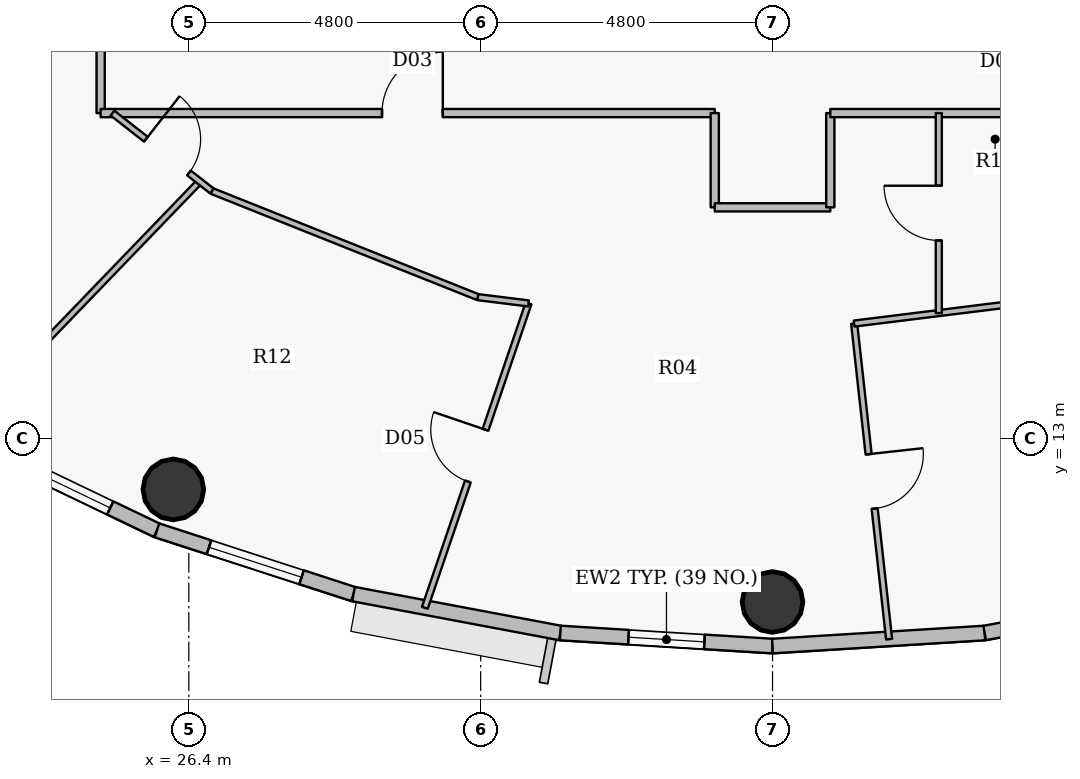
"""IFC4 building model, lengths in metres.
Left out: names, types, materials, properties, quantities, classifications, styles, units other than length and angle.
Written with IfcOpenShell. Run it as: python <this file> out.ifc"""

import sys

from ifc_helpers import new_model, si_unit, direction, frame, frame_2d, origin, origin_2d, place, context, subcontext, project, spatial, rectangle, hollow_circle, extrude, source, transform, mapped, element, fill, save


model = new_model("IFC4")
c1 = context("Model", 3, precision=1e-05, world=origin(), true_north=direction((0.0, 1.0)))
c2 = subcontext(c1, "Body", "Model", "MODEL_VIEW")
j1 = project(units=[si_unit("LENGTHUNIT", "METRE"), si_unit("PLANEANGLEUNIT", "RADIAN")], contexts=[c1])
p1 = place(None, origin())
s1 = spatial("IfcSite", under=j1, at=p1, CompositionType="ELEMENT")
p2 = place(p1, origin())
s2 = spatial("IfcBuilding", under=s1, at=p2, CompositionType="ELEMENT")
p3 = place(p2, frame((0.0, 0.0, 284.25)))
s3 = spatial("IfcBuildingStorey", under=s2, at=p3, CompositionType="ELEMENT", Elevation=284.25)
for number, where, z_axis, x_axis in (
    (1, (26.146, 12.161, 0.0), (0.0, 0.0, 1.0), (1.0, 0.0, 0.0)),
    (2, (36.0, 10.31, 0.0), (0.0, 0.0, 1.0), (1.0, 0.0, 0.0)),
):
    element("IfcColumn", number, at=place(p3, frame(where, z_axis=z_axis, x_axis=x_axis)), inside=s3, PredefinedType="COLUMN", context=c2, shape_type="SweptSolid", body=[
        extrude(hollow_circle(Radius=0.5, WallThickness=0.032, at=origin_2d()), origin(), (0.0, 0.0, 1.0), 3.75),
    ])
p4 = place(p3, frame((25.877, 11.488, 0.0), z_axis=(0.0, 0.0, 1.0), x_axis=(-0.901573741254, 0.43262546051, 0.0)))
e3 = element("IfcWall", 3, at=p4, inside=s3, PredefinedType="SOLIDWALL", context=c2, shape_type="SweptSolid", body=[
    extrude(rectangle(XDim=3.307, YDim=0.24, at=frame_2d((1.653, 0.0))), origin(), (0.0, 0.0, 1.0), 3.5),
])
p5 = place(p4, frame((0.853, 0.0, 0.9)))
e4 = element("IfcOpeningElement", 4, at=p5, cuts=e3, PredefinedType="OPENING", context=c2, shape_type="SweptSolid", body=[
    extrude(rectangle(XDim=1.6, YDim=1.75, at=origin_2d()), frame((0.8, 0.13, 0.875), z_axis=(0.0, -1.0, 0.0), x_axis=(1.0, 0.0, 0.0)), (0.0, 0.0, 1.0), 0.26),
])
p6 = place(p3, frame((29.109, 10.44, 0.0), z_axis=(0.0, 0.0, 1.0), x_axis=(-0.95123136723, 0.308478339592, 0.0)))
e5 = element("IfcWall", 5, at=p6, inside=s3, PredefinedType="SOLIDWALL", context=c2, shape_type="SweptSolid", body=[
    extrude(rectangle(XDim=3.398, YDim=0.24, at=frame_2d((1.699, 0.0))), origin(), (0.0, 0.0, 1.0), 3.5),
])
p7 = place(p6, frame((0.899, 0.0, 0.9)))
e6 = element("IfcOpeningElement", 6, at=p7, cuts=e5, PredefinedType="OPENING", context=c2, shape_type="SweptSolid", body=[
    extrude(rectangle(XDim=1.6, YDim=1.75, at=origin_2d()), frame((0.8, 0.13, 0.875), z_axis=(0.0, -1.0, 0.0), x_axis=(1.0, 0.0, 0.0)), (0.0, 0.0, 1.0), 0.26),
])
p8 = place(p3, frame((32.511, 9.8, 0.0), z_axis=(0.0, 0.0, 1.0), x_axis=(-0.982782655757, 0.184765395959, 0.0)))
e7 = element("IfcWall", 7, at=p8, inside=s3, PredefinedType="SOLIDWALL", context=c2, shape_type="SweptSolid", body=[
    extrude(rectangle(XDim=3.462, YDim=0.24, at=frame_2d((1.731, 0.0))), origin(), (0.0, 0.0, 1.0), 3.5),
])
p9 = place(p3, frame((36.0, 9.585, 0.0), z_axis=(0.0, 0.0, 1.0), x_axis=(-0.998104946479, 0.061534671648, 0.0)))
e8 = element("IfcWall", 8, at=p9, inside=s3, PredefinedType="SOLIDWALL", context=c2, shape_type="SweptSolid", body=[
    extrude(rectangle(XDim=3.495, YDim=0.24, at=frame_2d((1.748, 0.0))), origin(), (0.0, 0.0, 1.0), 3.5),
])
p10 = place(p9, frame((1.123, 0.0, 0.9)))
e9 = element("IfcOpeningElement", 9, at=p10, cuts=e8, PredefinedType="OPENING", context=c2, shape_type="SweptSolid", body=[
    extrude(rectangle(XDim=1.25, YDim=1.65, at=origin_2d()), frame((0.625, 0.13, 0.825), z_axis=(0.0, -1.0, 0.0), x_axis=(1.0, 0.0, 0.0)), (0.0, 0.0, 1.0), 0.26),
])
p11 = place(p3, frame((39.489, 9.8, 0.0), z_axis=(0.0, 0.0, 1.0), x_axis=(-0.998104946479, -0.061534671648, 0.0)))
e10 = element("IfcWall", 10, at=p11, inside=s3, PredefinedType="SOLIDWALL", context=c2, shape_type="SweptSolid", body=[
    extrude(rectangle(XDim=3.495, YDim=0.24, at=frame_2d((1.748, 0.0))), origin(), (0.0, 0.0, 1.0), 3.5),
])
p12 = place(p3, frame((42.891, 10.44, 0.0), z_axis=(0.0, 0.0, 1.0), x_axis=(-0.982782655757, -0.184765395959, 0.0)))
e11 = element("IfcWall", 11, at=p12, inside=s3, PredefinedType="SOLIDWALL", context=c2, shape_type="SweptSolid", body=[
    extrude(rectangle(XDim=3.462, YDim=0.24, at=frame_2d((1.731, 0.0))), origin(), (0.0, 0.0, 1.0), 3.5),
])
p13 = place(p12, frame((1.106, 0.0, 0.9)))
e12 = element("IfcOpeningElement", 12, at=p13, cuts=e11, PredefinedType="OPENING", context=c2, shape_type="SweptSolid", body=[
    extrude(rectangle(XDim=1.25, YDim=1.65, at=origin_2d()), frame((0.625, 0.13, 0.825), z_axis=(0.0, -1.0, 0.0), x_axis=(1.0, 0.0, 0.0)), (0.0, 0.0, 1.0), 0.26),
])
p14 = place(p3, frame((16.007, 19.358, 0.0), z_axis=(0.0, 0.0, 1.0), x_axis=(0.934094110355, 0.35702687994, 0.0)))
e13 = element("IfcWall", 13, at=p14, inside=s3, PredefinedType="PARTITIONING", context=c2, shape_type="SweptSolid", body=[
    extrude(rectangle(XDim=9.574, YDim=0.135, at=frame_2d((4.787, 0.0))), origin(), (0.0, 0.0, 1.0), 2.985),
])
p15 = place(p3, frame((22.607, 13.105, 0.0), z_axis=(0.0, 0.0, 1.0), x_axis=(0.693978480191, 0.71999574237, 0.0)))
e14 = element("IfcWall", 14, at=p15, inside=s3, PredefinedType="PARTITIONING", context=c2, shape_type="SweptSolid", body=[
    extrude(rectangle(XDim=5.724, YDim=0.1, at=frame_2d((2.862, 0.0))), origin(), (0.0, 0.0, 1.0), 2.985),
])
p16 = place(p3, frame((24.95, 18.35, 0.0), z_axis=(0.0, 0.0, 1.0), x_axis=(0.0, 1.0, 0.0)))
e15 = element("IfcWall", 15, at=p16, inside=s3, PredefinedType="PARTITIONING", context=c2, shape_type="SweptSolid", body=[
    extrude(rectangle(XDim=17.147, YDim=0.135, at=frame_2d((8.574, 0.0))), origin(), (0.0, 0.0, 1.0), 3.035),
])
p17 = place(p16, frame((10.267, 0.0, 0.0)))
e16 = element("IfcOpeningElement", 16, at=p17, cuts=e15, PredefinedType="OPENING", context=c2, shape_type="SweptSolid", body=[
    extrude(rectangle(XDim=1.0, YDim=2.15, at=origin_2d()), frame((0.5, 0.078, 1.075), z_axis=(0.0, -1.0, 0.0), x_axis=(1.0, 0.0, 0.0)), (0.0, 0.0, 1.0), 0.155),
])
p18 = place(p3, frame((24.95, 18.35, 0.0), z_axis=(0.0, 0.0, 1.0), x_axis=(1.0, 0.0, 0.0)))
e17 = element("IfcWall", 17, at=p18, inside=s3, PredefinedType="PARTITIONING", context=c2, shape_type="SweptSolid", body=[
    extrude(rectangle(XDim=10.1, YDim=0.135, at=frame_2d((5.05, 0.0))), origin(), (0.0, 0.0, 1.0), 3.035),
])
p19 = place(p18, frame((4.627, 0.0, 0.0)))
e18 = element("IfcOpeningElement", 18, at=p19, cuts=e17, PredefinedType="OPENING", context=c2, shape_type="SweptSolid", body=[
    extrude(rectangle(XDim=1.0, YDim=2.15, at=origin_2d()), frame((0.5, 0.078, 1.075), z_axis=(0.0, -1.0, 0.0), x_axis=(1.0, 0.0, 0.0)), (0.0, 0.0, 1.0), 0.155),
])
p20 = place(p3, frame((25.145, 18.35, 0.0), z_axis=(0.0, 0.0, 1.0), x_axis=(0.787326747019, -0.616535962803, 0.0)))
e19 = element("IfcWall", 19, at=p20, inside=s3, PredefinedType="PARTITIONING", context=c2, shape_type="SweptSolid", body=[
    extrude(rectangle(XDim=2.081, YDim=0.1, at=frame_2d((1.041, 0.0))), origin(), (0.0, 0.0, 1.0), 3.5),
])
p21 = place(p20, frame((0.698, 0.0, 0.0)))
e20 = element("IfcOpeningElement", 20, at=p21, cuts=e19, PredefinedType="OPENING", context=c2, shape_type="SweptSolid", body=[
    extrude(rectangle(XDim=0.9, YDim=2.1, at=origin_2d()), frame((0.45, 0.06, 1.05), z_axis=(0.0, -1.0, 0.0), x_axis=(1.0, 0.0, 0.0)), (0.0, 0.0, 1.0), 0.12),
])
p22 = place(p3, frame((26.783, 17.067, 0.0), z_axis=(0.0, 0.0, 1.0), x_axis=(0.928809047774, -0.370558703544, 0.0)))
e21 = element("IfcWall", 21, at=p22, inside=s3, PredefinedType="PARTITIONING", context=c2, shape_type="SweptSolid", body=[
    extrude(rectangle(XDim=4.706, YDim=0.1, at=frame_2d((2.353, 0.0))), origin(), (0.0, 0.0, 1.0), 3.035),
])
p23 = place(p3, frame((30.282, 10.214, 0.0), z_axis=(0.0, 0.0, 1.0), x_axis=(0.322425759237, 0.946594754782, 0.0)))
e22 = element("IfcWall", 22, at=p23, inside=s3, PredefinedType="PARTITIONING", context=c2, shape_type="SweptSolid", body=[
    extrude(rectangle(XDim=5.288, YDim=0.1, at=frame_2d((2.644, 0.0))), origin(), (0.0, 0.0, 1.0), 2.985),
])
p24 = place(p23, frame((2.194, 0.0, 0.0)))
e23 = element("IfcOpeningElement", 23, at=p24, cuts=e22, PredefinedType="OPENING", context=c2, shape_type="SweptSolid", body=[
    extrude(rectangle(XDim=0.9, YDim=2.1, at=origin_2d()), frame((0.45, 0.06, 1.05), z_axis=(0.0, -1.0, 0.0), x_axis=(1.0, 0.0, 0.0)), (0.0, 0.0, 1.0), 0.12),
])
p25 = place(p3, frame((31.155, 15.323, 0.0), z_axis=(0.0, 0.0, 1.0), x_axis=(0.992393849535, -0.123103401277, 0.0)))
e24 = element("IfcWall", 24, at=p25, inside=s3, PredefinedType="PARTITIONING", context=c2, shape_type="SweptSolid", body=[
    extrude(rectangle(XDim=0.839, YDim=0.1, at=frame_2d((0.419, 0.0))), origin(), (0.0, 0.0, 1.0), 3.5),
])
p26 = place(p3, frame((35.05, 16.8, 0.0), z_axis=(0.0, 0.0, 1.0), x_axis=(0.0, 1.0, 0.0)))
e25 = element("IfcWall", 25, at=p26, inside=s3, PredefinedType="PARTITIONING", context=c2, shape_type="SweptSolid", body=[
    extrude(rectangle(XDim=1.55, YDim=0.135, at=frame_2d((0.775, 0.0))), origin(), (0.0, 0.0, 1.0), 3.185),
])
p27 = place(p3, frame((35.05, 16.8, 0.0), z_axis=(0.0, 0.0, 1.0), x_axis=(1.0, 0.0, 0.0)))
e26 = element("IfcWall", 26, at=p27, inside=s3, PredefinedType="PARTITIONING", context=c2, shape_type="SweptSolid", body=[
    extrude(rectangle(XDim=1.9, YDim=0.135, at=frame_2d((0.95, 0.0))), origin(), (0.0, 0.0, 1.0), 3.035),
])
p28 = place(p3, frame((36.95, 16.8, 0.0), z_axis=(0.0, 0.0, 1.0), x_axis=(0.0, 1.0, 0.0)))
e27 = element("IfcWall", 27, at=p28, inside=s3, PredefinedType="PARTITIONING", context=c2, shape_type="SweptSolid", body=[
    extrude(rectangle(XDim=1.55, YDim=0.135, at=frame_2d((0.775, 0.0))), origin(), (0.0, 0.0, 1.0), 3.5),
])
p29 = place(p3, frame((36.95, 18.35, 0.0), z_axis=(0.0, 0.0, 1.0), x_axis=(1.0, 0.0, 0.0)))
e28 = element("IfcWall", 28, at=p29, inside=s3, PredefinedType="PARTITIONING", context=c2, shape_type="SweptSolid", body=[
    extrude(rectangle(XDim=10.1, YDim=0.135, at=frame_2d((5.05, 0.0))), origin(), (0.0, 0.0, 1.0), 3.035),
])
p30 = place(p3, frame((37.342, 14.888, 0.0), z_axis=(0.0, 0.0, 1.0), x_axis=(0.110149295127, -0.993915053102, 0.0)))
e29 = element("IfcWall", 29, at=p30, inside=s3, PredefinedType="PARTITIONING", context=c2, shape_type="SweptSolid", body=[
    extrude(rectangle(XDim=5.222, YDim=0.1, at=frame_2d((2.611, 0.0))), origin(), (0.0, 0.0, 1.0), 2.985),
])
p31 = place(p30, frame((2.161, 0.0, 0.0)))
e30 = element("IfcOpeningElement", 30, at=p31, cuts=e29, PredefinedType="OPENING", context=c2, shape_type="SweptSolid", body=[
    extrude(rectangle(XDim=0.9, YDim=2.1, at=origin_2d()), frame((0.45, 0.06, 1.05), z_axis=(0.0, -1.0, 0.0), x_axis=(1.0, 0.0, 0.0)), (0.0, 0.0, 1.0), 0.12),
])
p32 = place(p3, frame((37.342, 14.888, 0.0), z_axis=(0.0, 0.0, 1.0), x_axis=(0.992393420873, 0.123106856865, 0.0)))
e31 = element("IfcWall", 31, at=p32, inside=s3, PredefinedType="PARTITIONING", context=c2, shape_type="SweptSolid", body=[
    extrude(rectangle(XDim=3.53, YDim=0.1, at=frame_2d((1.765, 0.0))), origin(), (0.0, 0.0, 1.0), 3.035),
])
p33 = place(p3, frame((38.734, 15.061, 0.0), z_axis=(0.0, 0.0, 1.0), x_axis=(0.0, 1.0, 0.0)))
e32 = element("IfcWall", 32, at=p33, inside=s3, PredefinedType="PARTITIONING", context=c2, shape_type="SweptSolid", body=[
    extrude(rectangle(XDim=3.289, YDim=0.1, at=frame_2d((1.645, 0.0))), origin(), (0.0, 0.0, 1.0), 3.5),
])
p34 = place(p33, frame((1.194, 0.0, 0.0)))
e33 = element("IfcOpeningElement", 33, at=p34, cuts=e32, PredefinedType="OPENING", context=c2, shape_type="SweptSolid", body=[
    extrude(rectangle(XDim=0.9, YDim=2.1, at=origin_2d()), frame((0.45, 0.06, 1.05), z_axis=(0.0, -1.0, 0.0), x_axis=(1.0, 0.0, 0.0)), (0.0, 0.0, 1.0), 0.12),
])
m1 = source(origin(), c2, "Body", "SweptSolid", [
    extrude(rectangle(XDim=1.6, YDim=1.75, at=origin_2d()), frame((0.8, 0.03, 0.875), z_axis=(0.0, -1.0, 0.0), x_axis=(1.0, 0.0, 0.0)), (0.0, 0.0, 1.0), 0.06),
])
p35 = place(p5, origin())
e34 = element("IfcWindow", 34, at=p35, inside=s3, PartitioningType="DOUBLE_PANEL_VERTICAL", PredefinedType="WINDOW", context=c2, shape_type="MappedRepresentation", body=[
    mapped(m1, transform((0.0, 0.0, 0.0), x_axis=(1.0, 0.0, 0.0), y_axis=(0.0, 1.0, 0.0), z_axis=(0.0, 0.0, 1.0), scale=1.0)),
])
fill(e4, e34)
p36 = place(p7, origin())
e35 = element("IfcWindow", 35, at=p36, inside=s3, PartitioningType="DOUBLE_PANEL_VERTICAL", PredefinedType="WINDOW", context=c2, shape_type="MappedRepresentation", body=[
    mapped(m1, transform((0.0, 0.0, 0.0), x_axis=(1.0, 0.0, 0.0), y_axis=(0.0, 1.0, 0.0), z_axis=(0.0, 0.0, 1.0), scale=1.0)),
])
fill(e6, e35)
m2 = source(origin(), c2, "Body", "SweptSolid", [
    extrude(rectangle(XDim=1.25, YDim=1.65, at=origin_2d()), frame((0.625, 0.03, 0.825), z_axis=(0.0, -1.0, 0.0), x_axis=(1.0, 0.0, 0.0)), (0.0, 0.0, 1.0), 0.06),
])
p37 = place(p10, origin())
e36 = element("IfcWindow", 36, at=p37, inside=s3, PartitioningType="SINGLE_PANEL", PredefinedType="WINDOW", context=c2, shape_type="MappedRepresentation", body=[
    mapped(m2, transform((0.0, 0.0, 0.0), x_axis=(1.0, 0.0, 0.0), y_axis=(0.0, 1.0, 0.0), z_axis=(0.0, 0.0, 1.0), scale=1.0)),
])
fill(e9, e36)
m3 = source(origin(), c2, "Body", "SweptSolid", [
    extrude(rectangle(XDim=1.0, YDim=2.15, at=origin_2d()), frame((0.5, 0.025, 1.075), z_axis=(0.0, -1.0, 0.0), x_axis=(1.0, 0.0, 0.0)), (0.0, 0.0, 1.0), 0.05),
])
p38 = place(p19, origin())
e37 = element("IfcDoor", 37, at=p38, inside=s3, OperationType="SINGLE_SWING_RIGHT", PredefinedType="DOOR", context=c2, shape_type="MappedRepresentation", body=[
    mapped(m3, transform((0.0, 0.0, 0.0), x_axis=(1.0, 0.0, 0.0), y_axis=(0.0, 1.0, 0.0), z_axis=(0.0, 0.0, 1.0), scale=1.0)),
])
fill(e18, e37)
m4 = source(origin(), c2, "Body", "SweptSolid", [
    extrude(rectangle(XDim=0.9, YDim=2.1, at=origin_2d()), frame((0.45, 0.025, 1.05), z_axis=(0.0, -1.0, 0.0), x_axis=(1.0, 0.0, 0.0)), (0.0, 0.0, 1.0), 0.05),
])
p39 = place(p21, origin())
e38 = element("IfcDoor", 38, at=p39, inside=s3, OperationType="SINGLE_SWING_LEFT", PredefinedType="DOOR", context=c2, shape_type="MappedRepresentation", body=[
    mapped(m4, transform((0.0, 0.0, 0.0), x_axis=(1.0, 0.0, 0.0), y_axis=(0.0, 1.0, 0.0), z_axis=(0.0, 0.0, 1.0), scale=1.0)),
])
fill(e20, e38)
p40 = place(p24, origin())
e39 = element("IfcDoor", 39, at=p40, inside=s3, OperationType="SINGLE_SWING_RIGHT", PredefinedType="DOOR", context=c2, shape_type="MappedRepresentation", body=[
    mapped(m4, transform((0.0, 0.0, 0.0), x_axis=(1.0, 0.0, 0.0), y_axis=(0.0, 1.0, 0.0), z_axis=(0.0, 0.0, 1.0), scale=1.0)),
])
fill(e23, e39)
p41 = place(p31, origin())
e40 = element("IfcDoor", 40, at=p41, inside=s3, OperationType="SINGLE_SWING_LEFT", PredefinedType="DOOR", context=c2, shape_type="MappedRepresentation", body=[
    mapped(m4, transform((0.0, 0.0, 0.0), x_axis=(1.0, 0.0, 0.0), y_axis=(0.0, 1.0, 0.0), z_axis=(0.0, 0.0, 1.0), scale=1.0)),
])
fill(e30, e40)
p42 = place(p34, origin())
e41 = element("IfcDoor", 41, at=p42, inside=s3, OperationType="SINGLE_SWING_RIGHT", PredefinedType="DOOR", context=c2, shape_type="MappedRepresentation", body=[
    mapped(m4, transform((0.0, 0.0, 0.0), x_axis=(1.0, 0.0, 0.0), y_axis=(0.0, 1.0, 0.0), z_axis=(0.0, 0.0, 1.0), scale=1.0)),
])
fill(e33, e41)
save(model, sys.argv[1])
